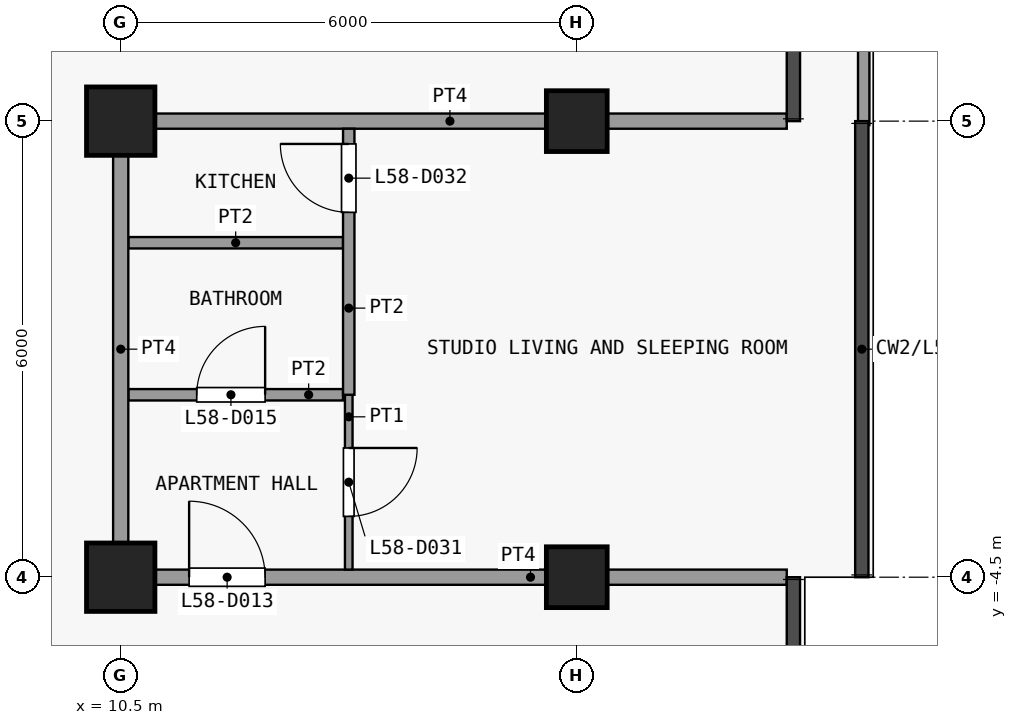
"""IFC4 building model, lengths in metres.
Left out: names, types, materials, properties, quantities, classifications, styles, units other than length and angle.
Written with IfcOpenShell. Run it as: python <this file> out.ifc"""

import sys

from ifc_helpers import new_model, si_unit, direction, frame, frame_2d, origin, origin_2d, place, context, subcontext, project, spatial, rectangle, extrude, element, fill, save


model = new_model("IFC4")
c1 = context("Model", 3, precision=1e-05, world=origin(), true_north=direction((0.0, 1.0)))
c2 = subcontext(c1, "Body", "Model", "MODEL_VIEW")
j1 = project(units=[si_unit("LENGTHUNIT", "METRE"), si_unit("PLANEANGLEUNIT", "RADIAN")], contexts=[c1])
p1 = place(None, origin())
s1 = spatial("IfcSite", under=j1, at=p1, CompositionType="ELEMENT")
p2 = place(p1, origin())
s2 = spatial("IfcBuilding", under=s1, at=p2, CompositionType="ELEMENT")
p3 = place(p2, frame((0.0, 0.0, 230.3)))
s3 = spatial("IfcBuildingStorey", under=s2, at=p3, CompositionType="ELEMENT", Elevation=230.3)
for number, where, z_axis, x_axis in (
    (1, (10.5, -4.5, 0.0), (0.0, 0.0, 1.0), (1.0, 0.0, 0.0)),
    (2, (10.5, 1.5, 0.0), (0.0, 0.0, 1.0), (1.0, 0.0, 0.0)),
):
    element("IfcColumn", number, at=place(p3, frame(where, z_axis=z_axis, x_axis=x_axis)), inside=s3, PredefinedType="COLUMN", context=c2, shape_type="SweptSolid", body=[
        extrude(rectangle(XDim=0.9, YDim=0.9, at=origin_2d()), origin(), (0.0, 0.0, 1.0), 3.6),
    ])
for number, where, z_axis, x_axis in (
    (3, (16.5, -4.5, 0.0), (0.0, 0.0, 1.0), (1.0, 0.0, 0.0)),
    (4, (16.5, 1.5, 0.0), (0.0, 0.0, 1.0), (1.0, 0.0, 0.0)),
):
    element("IfcColumn", number, at=place(p3, frame(where, z_axis=z_axis, x_axis=x_axis)), inside=s3, PredefinedType="COLUMN", context=c2, shape_type="SweptSolid", body=[
        extrude(rectangle(XDim=0.8, YDim=0.8, at=origin_2d()), origin(), (0.0, 0.0, 1.0), 3.6),
    ])
p4 = place(p3, frame((20.275, 7.3, 0.0), z_axis=(0.0, 0.0, 1.0), x_axis=(0.0, -1.0, 0.0)))
e5 = element("IfcWall", 5, at=p4, inside=s3, PredefinedType="PARAPET", context=c2, shape_type="SweptSolid", body=[
    extrude(rectangle(XDim=5.853, YDim=0.15, at=frame_2d((2.926, 0.0))), origin(), (0.0, 0.0, 1.0), 1.15),
])
p5 = place(p3, frame((10.4, -4.5, 0.0), z_axis=(0.0, 0.0, 1.0), x_axis=(1.0, 0.0, 0.0)))
e6 = element("IfcWall", 6, at=p5, inside=s3, PredefinedType="PARTITIONING", context=c2, shape_type="SweptSolid", body=[
    extrude(rectangle(XDim=8.863, YDim=0.2, at=frame_2d((4.431, 0.0))), origin(), (0.0, 0.0, 1.0), 3.3),
])
p6 = place(p5, frame((1.0, 0.0, 0.0)))
e7 = element("IfcOpeningElement", 7, at=p6, cuts=e6, PredefinedType="OPENING", context=c2, shape_type="SweptSolid", body=[
    extrude(rectangle(XDim=1.0, YDim=2.1, at=frame_2d((0.5, 1.05))), frame((0.0, 0.11, 0.0), z_axis=(0.0, -1.0, 0.0), x_axis=(1.0, 0.0, 0.0)), (0.0, 0.0, 1.0), 0.22),
])
p7 = place(p3, frame((10.6, -2.1, 0.0), z_axis=(0.0, 0.0, 1.0), x_axis=(1.0, 0.0, 0.0)))
e8 = element("IfcWall", 8, at=p7, inside=s3, PredefinedType="PARTITIONING", context=c2, shape_type="SweptSolid", body=[
    extrude(rectangle(XDim=2.825, YDim=0.15, at=frame_2d((1.413, 0.0))), origin(), (0.0, 0.0, 1.0), 3.3),
])
p8 = place(p7, frame((0.9, 0.0, 0.0)))
e9 = element("IfcOpeningElement", 9, at=p8, cuts=e8, PredefinedType="OPENING", context=c2, shape_type="SweptSolid", body=[
    extrude(rectangle(XDim=0.9, YDim=2.1, at=frame_2d((0.45, 1.05))), frame((0.0, 0.085, 0.0), z_axis=(0.0, -1.0, 0.0), x_axis=(1.0, 0.0, 0.0)), (0.0, 0.0, 1.0), 0.17),
])
p9 = place(p3, frame((10.6, -0.1, 0.0), z_axis=(0.0, 0.0, 1.0), x_axis=(1.0, 0.0, 0.0)))
e10 = element("IfcWall", 10, at=p9, inside=s3, PredefinedType="PARTITIONING", context=c2, shape_type="SweptSolid", body=[
    extrude(rectangle(XDim=2.825, YDim=0.15, at=frame_2d((1.413, 0.0))), origin(), (0.0, 0.0, 1.0), 3.3),
])
p10 = place(p3, frame((10.4, 1.5, 0.0), z_axis=(0.0, 0.0, 1.0), x_axis=(1.0, 0.0, 0.0)))
e11 = element("IfcWall", 11, at=p10, inside=s3, PredefinedType="PARTITIONING", context=c2, shape_type="SweptSolid", body=[
    extrude(rectangle(XDim=8.863, YDim=0.2, at=frame_2d((4.431, 0.0))), origin(), (0.0, 0.0, 1.0), 3.3),
])
p11 = place(p3, frame((10.5, -4.4, 0.0), z_axis=(0.0, 0.0, 1.0), x_axis=(0.0, 1.0, 0.0)))
e12 = element("IfcWall", 12, at=p11, inside=s3, PredefinedType="PARTITIONING", context=c2, shape_type="SweptSolid", body=[
    extrude(rectangle(XDim=5.8, YDim=0.2, at=frame_2d((2.9, 0.0))), origin(), (0.0, 0.0, 1.0), 3.3),
])
p12 = place(p3, frame((13.5, -4.4, 0.0), z_axis=(0.0, 0.0, 1.0), x_axis=(0.0, 1.0, 0.0)))
e13 = element("IfcWall", 13, at=p12, inside=s3, PredefinedType="PARTITIONING", context=c2, shape_type="SweptSolid", body=[
    extrude(rectangle(XDim=2.3, YDim=0.1, at=frame_2d((1.15, 0.0))), origin(), (0.0, 0.0, 1.0), 3.3),
])
p13 = place(p12, frame((0.7, 0.0, 0.0)))
e14 = element("IfcOpeningElement", 14, at=p13, cuts=e13, PredefinedType="OPENING", context=c2, shape_type="SweptSolid", body=[
    extrude(rectangle(XDim=0.9, YDim=2.1, at=frame_2d((0.45, 1.05))), frame((0.0, 0.06, 0.0), z_axis=(0.0, -1.0, 0.0), x_axis=(1.0, 0.0, 0.0)), (0.0, 0.0, 1.0), 0.12),
])
p14 = place(p3, frame((13.5, -2.1, 0.0), z_axis=(0.0, 0.0, 1.0), x_axis=(0.0, 1.0, 0.0)))
e15 = element("IfcWall", 15, at=p14, inside=s3, PredefinedType="PARTITIONING", context=c2, shape_type="SweptSolid", body=[
    extrude(rectangle(XDim=3.5, YDim=0.15, at=frame_2d((1.75, 0.0))), origin(), (0.0, 0.0, 1.0), 3.3),
])
p15 = place(p14, frame((2.4, 0.0, 0.0)))
e16 = element("IfcOpeningElement", 16, at=p15, cuts=e15, PredefinedType="OPENING", context=c2, shape_type="SweptSolid", body=[
    extrude(rectangle(XDim=0.9, YDim=2.1, at=frame_2d((0.45, 1.05))), frame((0.0, 0.085, 0.0), z_axis=(0.0, -1.0, 0.0), x_axis=(1.0, 0.0, 0.0)), (0.0, 0.0, 1.0), 0.17),
])
p16 = place(p6, origin())
e17 = element("IfcDoor", 17, at=p16, inside=s3, OperationType="SINGLE_SWING_RIGHT", PredefinedType="DOOR", context=c2, shape_type="SweptSolid", body=[
    extrude(rectangle(XDim=1.0, YDim=2.1, at=frame_2d((0.5, 1.05))), frame((0.0, 0.025, 0.0), z_axis=(0.0, -1.0, 0.0), x_axis=(1.0, 0.0, 0.0)), (0.0, 0.0, 1.0), 0.05),
])
fill(e7, e17)
p17 = place(p8, origin())
e18 = element("IfcDoor", 18, at=p17, inside=s3, OperationType="SINGLE_SWING_LEFT", PredefinedType="DOOR", context=c2, shape_type="SweptSolid", body=[
    extrude(rectangle(XDim=0.9, YDim=2.1, at=frame_2d((0.45, 1.05))), frame((0.0, 0.025, 0.0), z_axis=(0.0, -1.0, 0.0), x_axis=(1.0, 0.0, 0.0)), (0.0, 0.0, 1.0), 0.05),
])
fill(e9, e18)
p18 = place(p13, origin())
e19 = element("IfcDoor", 19, at=p18, inside=s3, OperationType="SINGLE_SWING_RIGHT", PredefinedType="DOOR", context=c2, shape_type="SweptSolid", body=[
    extrude(rectangle(XDim=0.9, YDim=2.1, at=frame_2d((0.45, 1.05))), frame((0.0, 0.025, 0.0), z_axis=(0.0, -1.0, 0.0), x_axis=(1.0, 0.0, 0.0)), (0.0, 0.0, 1.0), 0.05),
])
fill(e14, e19)
p19 = place(p15, origin())
e20 = element("IfcDoor", 20, at=p19, inside=s3, OperationType="SINGLE_SWING_LEFT", PredefinedType="DOOR", context=c2, shape_type="SweptSolid", body=[
    extrude(rectangle(XDim=0.9, YDim=2.1, at=frame_2d((0.45, 1.05))), frame((0.0, 0.025, 0.0), z_axis=(0.0, -1.0, 0.0), x_axis=(1.0, 0.0, 0.0)), (0.0, 0.0, 1.0), 0.05),
])
fill(e16, e20)
save(model, sys.argv[1])
